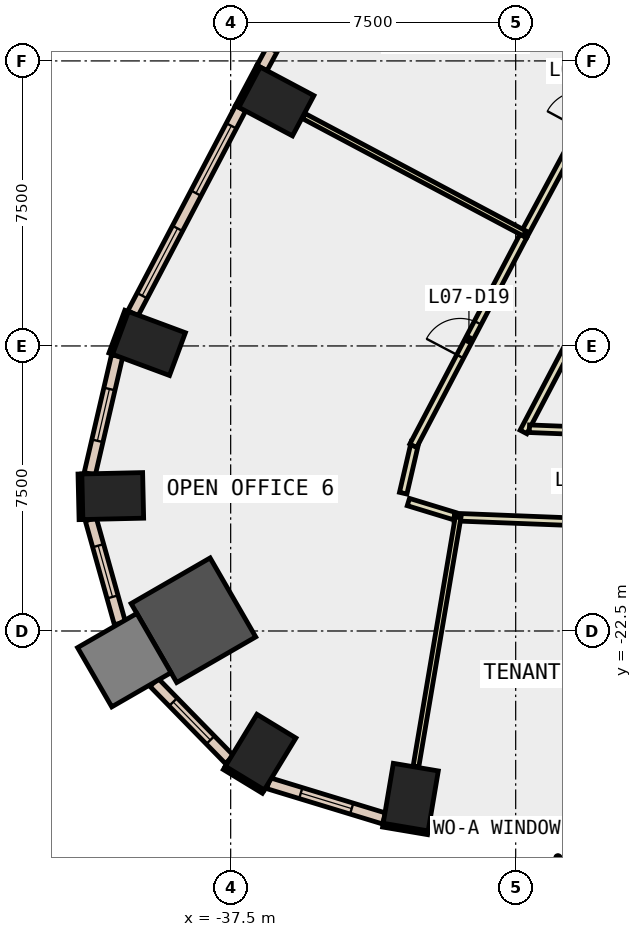
"""IFC4 building model, lengths in metres.
Left out: names, types, materials, properties, quantities, classifications, styles, units other than length and angle.
Written with IfcOpenShell. Run it as: python <this file> out.ifc"""

import sys

from ifc_helpers import new_model, si_unit, direction, frame, frame_2d, origin, origin_2d, place, context, subcontext, project, spatial, rectangle, extrude, element, fill, save


model = new_model("IFC4")
c1 = context("Model", 3, precision=1e-05, world=origin(), true_north=direction((0.0, 1.0)))
c2 = subcontext(c1, "Body", "Model", "MODEL_VIEW")
j1 = project(units=[si_unit("LENGTHUNIT", "METRE"), si_unit("PLANEANGLEUNIT", "RADIAN")], contexts=[c1])
p1 = place(None, origin())
s1 = spatial("IfcSite", under=j1, at=p1, CompositionType="ELEMENT")
p2 = place(p1, origin())
s2 = spatial("IfcBuilding", under=s1, at=p2, CompositionType="ELEMENT")
p3 = place(p2, frame((0.0, 0.0, 39.2)))
s3 = spatial("IfcBuildingStorey", under=s2, at=p3, CompositionType="ELEMENT", Elevation=39.2)
for number, where, z_axis, x_axis in (
    (1, (-32.761, -26.871, -0.4), (0.0, 0.0, 1.0), (-0.986, 0.167, 0.0)),
    (2, (-36.298, -8.567, -0.4), (0.0, 0.0, 1.0), (0.469, 0.883, 0.0)),
    (3, (-39.65, -14.936, -0.4), (0.0, 0.0, 1.0), (0.348, 0.937, 0.0)),
    (4, (-40.603, -18.95, -0.4), (0.0, 0.0, 1.0), (-0.023, 1.0, 0.0)),
):
    element("IfcColumn", number, at=place(p3, frame(where, z_axis=z_axis, x_axis=x_axis)), inside=s3, PredefinedType="COLUMN", context=c2, shape_type="SweptSolid", body=[
        extrude(rectangle(XDim=1.2, YDim=1.6, at=origin_2d()), origin(), (0.0, 0.0, 1.0), 4.2),
    ])
p4 = place(p3, frame((-38.48, -22.217, -0.4), z_axis=(0.0, 0.0, 1.0), x_axis=(0.866025403784, 0.5, 0.0)))
e5 = element("IfcColumn", 5, at=p4, inside=s3, PredefinedType="COLUMN", context=c2, shape_type="SweptSolid", body=[
    extrude(rectangle(XDim=2.4, YDim=2.4, at=origin_2d()), origin(), (0.0, 0.0, 1.0), 4.2),
])
p5 = place(p3, frame((-36.712, -25.688, -0.4), z_axis=(0.0, 0.0, 1.0), x_axis=(-0.854522294989, 0.519414716163, 0.0)))
e6 = element("IfcColumn", 6, at=p5, inside=s3, PredefinedType="COLUMN", context=c2, shape_type="SweptSolid", body=[
    extrude(rectangle(XDim=1.2, YDim=1.6, at=origin_2d()), origin(), (0.0, 0.0, 1.0), 4.2),
])
p6 = place(p3, frame((-40.299, -23.267, -0.4), z_axis=(0.0, 0.0, 1.0), x_axis=(0.866025403784, 0.5, 0.0)))
e7 = element("IfcColumn", 7, at=p6, inside=s3, PredefinedType="COLUMN", context=c2, shape_type="SweptSolid", body=[
    extrude(rectangle(XDim=1.8, YDim=1.8, at=origin_2d()), origin(), (0.0, 0.0, 1.0), 4.2),
])
p7 = place(p3, frame((-36.767, -7.639, 0.0), z_axis=(0.0, 0.0, 1.0), x_axis=(-0.469383408131, -0.882994459876, 0.0)))
e8 = element("IfcWall", 8, at=p7, inside=s3, PredefinedType="STANDARD", context=c2, shape_type="SweptSolid", body=[
    extrude(rectangle(XDim=1.199, YDim=0.1, at=frame_2d((0.6, 0.0))), origin(), (0.0, 0.0, 1.0), 3.8),
])
p8 = place(p3, frame((-40.238, -14.078, 0.0), z_axis=(0.0, 0.0, 1.0), x_axis=(-0.348268249601, -0.937394914814, 0.0)))
e9 = element("IfcWall", 9, at=p8, inside=s3, PredefinedType="STANDARD", context=c2, shape_type="SweptSolid", body=[
    extrude(rectangle(XDim=1.2, YDim=0.1, at=frame_2d((0.6, 0.0))), origin(), (0.0, 0.0, 1.0), 3.8),
])
p9 = place(p3, frame((-33.494, -27.609, 0.0), z_axis=(0.0, 0.0, 1.0), x_axis=(0.98597830993, -0.166873522011, 0.0)))
e10 = element("IfcWall", 10, at=p9, inside=s3, PredefinedType="STANDARD", context=c2, shape_type="SweptSolid", body=[
    extrude(rectangle(XDim=1.2, YDim=0.1, at=frame_2d((0.6, 0.0))), origin(), (0.0, 0.0, 1.0), 3.8),
])
for number, where, z_axis, x_axis in (
    (11, (-41.467, -18.369, 0.0), (0.0, 0.0, 1.0), (0.023, -1.0, 0.0)),
    (12, (-37.666, -26.103, 0.0), (0.0, 0.0, 1.0), (0.855, -0.519, 0.0)),
):
    element("IfcWall", number, at=place(p3, frame(where, z_axis=z_axis, x_axis=x_axis)), inside=s3, PredefinedType="STANDARD", context=c2, shape_type="SweptSolid", body=[
        extrude(rectangle(XDim=1.2, YDim=0.1, at=frame_2d((0.6, 0.0))), origin(), (0.0, 0.0, 1.0), 3.8),
    ])
p10 = place(p3, frame((-32.282, -27.633, 0.0), z_axis=(0.0, 0.0, 1.0), x_axis=(0.999228146648, -0.039282450878, 0.0)))
e13 = element("IfcWall", 13, at=p10, inside=s3, PredefinedType="STANDARD", context=c2, shape_type="SweptSolid", body=[
    extrude(rectangle(XDim=7.154, YDim=0.3, at=frame_2d((3.577, 0.0))), origin(), (0.0, 0.0, 1.0), 3.8),
])
p11 = place(p10, frame((0.588, 0.0, 0.9)))
e14 = element("IfcOpeningElement", 14, at=p11, cuts=e13, PredefinedType="OPENING", context=c2, shape_type="SweptSolid", body=[
    extrude(rectangle(XDim=2.4, YDim=2.6, at=frame_2d((1.2, 1.3))), frame((0.0, 0.16, 0.0), z_axis=(0.0, -1.0, 0.0), x_axis=(1.0, 0.0, 0.0)), (0.0, 0.0, 1.0), 0.32),
])
p12 = place(p10, frame((4.165, 0.0, 0.9)))
e15 = element("IfcOpeningElement", 15, at=p12, cuts=e13, PredefinedType="OPENING", context=c2, shape_type="SweptSolid", body=[
    extrude(rectangle(XDim=2.4, YDim=2.6, at=frame_2d((1.2, 1.3))), frame((0.0, 0.16, 0.0), z_axis=(0.0, -1.0, 0.0), x_axis=(1.0, 0.0, 0.0)), (0.0, 0.0, 1.0), 0.32),
])
p13 = place(p3, frame((-33.779, -2.301, 0.0), z_axis=(0.0, 0.0, 1.0), x_axis=(-0.47375467653, -0.880656860795, 0.0)))
e16 = element("IfcWall", 16, at=p13, inside=s3, PredefinedType="STANDARD", context=c2, shape_type="SweptSolid", body=[
    extrude(rectangle(XDim=6.117, YDim=0.3, at=frame_2d((3.059, 0.0))), origin(), (0.0, 0.0, 1.0), 3.8),
])
p14 = place(p13, frame((0.529, 0.0, 0.9)))
e17 = element("IfcOpeningElement", 17, at=p14, cuts=e16, PredefinedType="OPENING", context=c2, shape_type="SweptSolid", body=[
    extrude(rectangle(XDim=2.0, YDim=2.6, at=frame_2d((1.0, 1.3))), frame((0.0, 0.16, 0.0), z_axis=(0.0, -1.0, 0.0), x_axis=(1.0, 0.0, 0.0)), (0.0, 0.0, 1.0), 0.32),
])
p15 = place(p13, frame((3.588, 0.0, 0.9)))
e18 = element("IfcOpeningElement", 18, at=p15, cuts=e16, PredefinedType="OPENING", context=c2, shape_type="SweptSolid", body=[
    extrude(rectangle(XDim=2.0, YDim=2.6, at=frame_2d((1.0, 1.3))), frame((0.0, 0.16, 0.0), z_axis=(0.0, -1.0, 0.0), x_axis=(1.0, 0.0, 0.0)), (0.0, 0.0, 1.0), 0.32),
])
p16 = place(p3, frame((-37.239, -8.746, 0.0), z_axis=(0.0, 0.0, 1.0), x_axis=(-0.464913987781, -0.885355851602, 0.0)))
e19 = element("IfcWall", 19, at=p16, inside=s3, PredefinedType="STANDARD", context=c2, shape_type="SweptSolid", body=[
    extrude(rectangle(XDim=6.094, YDim=0.3, at=frame_2d((3.047, 0.0))), origin(), (0.0, 0.0, 1.0), 3.8),
])
p17 = place(p16, frame((0.523, 0.0, 0.9)))
e20 = element("IfcOpeningElement", 20, at=p17, cuts=e19, PredefinedType="OPENING", context=c2, shape_type="SweptSolid", body=[
    extrude(rectangle(XDim=2.0, YDim=2.6, at=frame_2d((1.0, 1.3))), frame((0.0, 0.16, 0.0), z_axis=(0.0, -1.0, 0.0), x_axis=(1.0, 0.0, 0.0)), (0.0, 0.0, 1.0), 0.32),
])
p18 = place(p16, frame((3.57, 0.0, 0.9)))
e21 = element("IfcOpeningElement", 21, at=p18, cuts=e19, PredefinedType="OPENING", context=c2, shape_type="SweptSolid", body=[
    extrude(rectangle(XDim=2.0, YDim=2.6, at=frame_2d((1.0, 1.3))), frame((0.0, 0.16, 0.0), z_axis=(0.0, -1.0, 0.0), x_axis=(1.0, 0.0, 0.0)), (0.0, 0.0, 1.0), 0.32),
])
p19 = place(p3, frame((-40.489, -15.264, 0.0), z_axis=(0.0, 0.0, 1.0), x_axis=(-0.225929520451, -0.974143650489, 0.0)))
e22 = element("IfcWall", 22, at=p19, inside=s3, PredefinedType="STANDARD", context=c2, shape_type="SweptSolid", body=[
    extrude(rectangle(XDim=3.182, YDim=0.3, at=frame_2d((1.591, 0.0))), origin(), (0.0, 0.0, 1.0), 3.8),
])
p20 = place(p19, frame((0.891, 0.0, 0.9)))
e23 = element("IfcOpeningElement", 23, at=p20, cuts=e22, PredefinedType="OPENING", context=c2, shape_type="SweptSolid", body=[
    extrude(rectangle(XDim=1.4, YDim=2.6, at=frame_2d((0.7, 1.3))), frame((0.0, 0.16, 0.0), z_axis=(0.0, -1.0, 0.0), x_axis=(1.0, 0.0, 0.0)), (0.0, 0.0, 1.0), 0.32),
])
p21 = place(p3, frame((-41.181, -19.562, 0.0), z_axis=(0.0, 0.0, 1.0), x_axis=(0.269754317033, -0.962929181426, 0.0)))
e24 = element("IfcWall", 24, at=p21, inside=s3, PredefinedType="STANDARD", context=c2, shape_type="SweptSolid", body=[
    extrude(rectangle(XDim=2.839, YDim=0.3, at=frame_2d((1.419, 0.0))), origin(), (0.0, 0.0, 1.0), 3.8),
])
p22 = place(p21, frame((0.72, 0.0, 0.9)))
e25 = element("IfcOpeningElement", 25, at=p22, cuts=e24, PredefinedType="OPENING", context=c2, shape_type="SweptSolid", body=[
    extrude(rectangle(XDim=1.4, YDim=2.6, at=frame_2d((0.7, 1.3))), frame((0.0, 0.16, 0.0), z_axis=(0.0, -1.0, 0.0), x_axis=(1.0, 0.0, 0.0)), (0.0, 0.0, 1.0), 0.32),
])
p23 = place(p3, frame((-39.516, -23.853, 0.0), z_axis=(0.0, 0.0, 1.0), x_axis=(0.699151821451, -0.714973237654, 0.0)))
e26 = element("IfcWall", 26, at=p23, inside=s3, PredefinedType="STANDARD", context=c2, shape_type="SweptSolid", body=[
    extrude(rectangle(XDim=2.839, YDim=0.3, at=frame_2d((1.42, 0.0))), origin(), (0.0, 0.0, 1.0), 3.8),
])
p24 = place(p23, frame((0.72, 0.0, 0.9)))
e27 = element("IfcOpeningElement", 27, at=p24, cuts=e26, PredefinedType="OPENING", context=c2, shape_type="SweptSolid", body=[
    extrude(rectangle(XDim=1.4, YDim=2.6, at=frame_2d((0.7, 1.3))), frame((0.0, 0.16, 0.0), z_axis=(0.0, -1.0, 0.0), x_axis=(1.0, 0.0, 0.0)), (0.0, 0.0, 1.0), 0.32),
])
p25 = place(p3, frame((-36.507, -26.505, 0.0), z_axis=(0.0, 0.0, 1.0), x_axis=(0.95648967224, -0.291766185322, 0.0)))
e28 = element("IfcWall", 28, at=p25, inside=s3, PredefinedType="STANDARD", context=c2, shape_type="SweptSolid", body=[
    extrude(rectangle(XDim=3.181, YDim=0.3, at=frame_2d((1.591, 0.0))), origin(), (0.0, 0.0, 1.0), 3.8),
])
p26 = place(p25, frame((0.891, 0.0, 0.9)))
e29 = element("IfcOpeningElement", 29, at=p26, cuts=e28, PredefinedType="OPENING", context=c2, shape_type="SweptSolid", body=[
    extrude(rectangle(XDim=1.4, YDim=2.6, at=frame_2d((0.7, 1.3))), frame((0.0, 0.16, 0.0), z_axis=(0.0, -1.0, 0.0), x_axis=(1.0, 0.0, 0.0)), (0.0, 0.0, 1.0), 0.32),
])
p27 = place(p3, frame((-27.644, -13.167, 0.0), z_axis=(0.0, 0.0, 1.0), x_axis=(-0.464919738277, -0.885352831904, 0.0)))
e30 = element("IfcWall", 30, at=p27, inside=s3, PredefinedType="PARTITIONING", context=c2, shape_type="SweptSolid", body=[
    extrude(rectangle(XDim=4.626, YDim=0.2, at=frame_2d((2.313, 0.0))), origin(), (0.0, 0.0, 1.0), 3.8),
])
p28 = place(p3, frame((-29.639, -17.178, 0.0), z_axis=(0.0, 0.0, 1.0), x_axis=(0.999228076722, -0.039284229546, 0.0)))
e31 = element("IfcWall", 31, at=p28, inside=s3, PredefinedType="PARTITIONING", context=c2, shape_type="SweptSolid", body=[
    extrude(rectangle(XDim=4.021, YDim=0.2, at=frame_2d((2.01, 0.0))), origin(), (0.0, 0.0, 1.0), 3.8),
])
p29 = place(p3, frame((-29.799, -12.106, 0.0), z_axis=(0.0, 0.0, 1.0), x_axis=(0.473681086062, 0.880696445268, 0.0)))
e32 = element("IfcWall", 32, at=p29, inside=s3, PredefinedType="PARTITIONING", context=c2, shape_type="SweptSolid", body=[
    extrude(rectangle(XDim=7.233, YDim=0.2, at=frame_2d((3.616, 0.0))), origin(), (0.0, 0.0, 1.0), 3.8),
])
p30 = place(p29, frame((3.191, 0.0, 0.0)))
e33 = element("IfcOpeningElement", 33, at=p30, cuts=e32, PredefinedType="OPENING", context=c2, shape_type="SweptSolid", body=[
    extrude(rectangle(XDim=1.0, YDim=2.1, at=frame_2d((0.5, 1.05))), frame((0.0, 0.11, 0.0), z_axis=(0.0, -1.0, 0.0), x_axis=(1.0, 0.0, 0.0)), (0.0, 0.0, 1.0), 0.22),
])
p31 = place(p3, frame((-31.611, -19.477, 0.0), z_axis=(0.0, 0.0, 1.0), x_axis=(-0.956459113118, 0.291866347723, 0.0)))
e34 = element("IfcWall", 34, at=p31, inside=s3, PredefinedType="PARTITIONING", context=c2, shape_type="SweptSolid", body=[
    extrude(rectangle(XDim=1.268, YDim=0.2, at=frame_2d((0.634, 0.0))), origin(), (0.0, 0.0, 1.0), 3.8),
])
p32 = place(p3, frame((-32.96, -18.874, 0.0), z_axis=(0.0, 0.0, 1.0), x_axis=(0.226081445763, 0.974108402531, 0.0)))
e35 = element("IfcWall", 35, at=p32, inside=s3, PredefinedType="PARTITIONING", context=c2, shape_type="SweptSolid", body=[
    extrude(rectangle(XDim=1.371, YDim=0.2, at=frame_2d((0.686, 0.0))), origin(), (0.0, 0.0, 1.0), 3.8),
])
p33 = place(p3, frame((-32.696, -17.626, 0.0), z_axis=(0.0, 0.0, 1.0), x_axis=(0.464767882002, 0.885432558617, 0.0)))
e36 = element("IfcWall", 36, at=p33, inside=s3, PredefinedType="PARTITIONING", context=c2, shape_type="SweptSolid", body=[
    extrude(rectangle(XDim=6.233, YDim=0.2, at=frame_2d((3.117, 0.0))), origin(), (0.0, 0.0, 1.0), 3.8),
])
p34 = place(p33, frame((2.654, 0.0, 0.0)))
e37 = element("IfcOpeningElement", 37, at=p34, cuts=e36, PredefinedType="OPENING", context=c2, shape_type="SweptSolid", body=[
    extrude(rectangle(XDim=1.0, YDim=2.1, at=frame_2d((0.5, 1.05))), frame((0.0, 0.11, 0.0), z_axis=(0.0, -1.0, 0.0), x_axis=(1.0, 0.0, 0.0)), (0.0, 0.0, 1.0), 0.22),
])
p35 = place(p3, frame((-24.186, -19.795, 0.0), z_axis=(0.0, 0.0, 1.0), x_axis=(-0.9992284676, 0.039274285953, 0.0)))
e38 = element("IfcWall", 38, at=p35, inside=s3, PredefinedType="PARTITIONING", context=c2, shape_type="SweptSolid", body=[
    extrude(rectangle(XDim=7.435, YDim=0.2, at=frame_2d((3.717, 0.0))), origin(), (0.0, 0.0, 1.0), 3.8),
])
p36 = place(p35, frame((3.217, 0.0, 0.0)))
e39 = element("IfcOpeningElement", 39, at=p36, cuts=e38, PredefinedType="OPENING", context=c2, shape_type="SweptSolid", body=[
    extrude(rectangle(XDim=1.0, YDim=2.1, at=frame_2d((0.5, 1.05))), frame((0.0, 0.11, 0.0), z_axis=(0.0, -1.0, 0.0), x_axis=(1.0, 0.0, 0.0)), (0.0, 0.0, 1.0), 0.22),
])
p37 = place(p3, frame((-29.764, -12.04, 0.0), z_axis=(0.0, 0.0, 1.0), x_axis=(-0.883018657393, 0.469337885426, 0.0)))
e40 = element("IfcWall", 40, at=p37, inside=s3, PredefinedType="PARTITIONING", context=c2, shape_type="SweptSolid", body=[
    extrude(rectangle(XDim=6.58, YDim=0.15, at=frame_2d((3.29, 0.0))), origin(), (0.0, 0.0, 1.0), 3.8),
])
p38 = place(p3, frame((-31.515, -19.506, 0.0), z_axis=(0.0, 0.0, 1.0), x_axis=(-0.166785823947, -0.985993148521, 0.0)))
e41 = element("IfcWall", 41, at=p38, inside=s3, PredefinedType="PARTITIONING", context=c2, shape_type="SweptSolid", body=[
    extrude(rectangle(XDim=6.65, YDim=0.15, at=frame_2d((3.325, 0.0))), origin(), (0.0, 0.0, 1.0), 3.8),
])
p39 = place(p11, origin())
e42 = element("IfcWindow", 42, at=p39, inside=s3, PartitioningType="SINGLE_PANEL", PredefinedType="WINDOW", context=c2, shape_type="SweptSolid", body=[
    extrude(rectangle(XDim=2.4, YDim=2.6, at=frame_2d((1.2, 1.3))), frame((0.0, 0.03, 0.0), z_axis=(0.0, -1.0, 0.0), x_axis=(1.0, 0.0, 0.0)), (0.0, 0.0, 1.0), 0.06),
])
fill(e14, e42)
p40 = place(p17, origin())
e43 = element("IfcWindow", 43, at=p40, inside=s3, PartitioningType="SINGLE_PANEL", PredefinedType="WINDOW", context=c2, shape_type="SweptSolid", body=[
    extrude(rectangle(XDim=2.0, YDim=2.6, at=frame_2d((1.0, 1.3))), frame((0.0, 0.03, 0.0), z_axis=(0.0, -1.0, 0.0), x_axis=(1.0, 0.0, 0.0)), (0.0, 0.0, 1.0), 0.06),
])
fill(e20, e43)
p41 = place(p18, origin())
e44 = element("IfcWindow", 44, at=p41, inside=s3, PartitioningType="SINGLE_PANEL", PredefinedType="WINDOW", context=c2, shape_type="SweptSolid", body=[
    extrude(rectangle(XDim=2.0, YDim=2.6, at=frame_2d((1.0, 1.3))), frame((0.0, 0.03, 0.0), z_axis=(0.0, -1.0, 0.0), x_axis=(1.0, 0.0, 0.0)), (0.0, 0.0, 1.0), 0.06),
])
fill(e21, e44)
p42 = place(p20, origin())
e45 = element("IfcWindow", 45, at=p42, inside=s3, PartitioningType="SINGLE_PANEL", PredefinedType="WINDOW", context=c2, shape_type="SweptSolid", body=[
    extrude(rectangle(XDim=1.4, YDim=2.6, at=frame_2d((0.7, 1.3))), frame((0.0, 0.03, 0.0), z_axis=(0.0, -1.0, 0.0), x_axis=(1.0, 0.0, 0.0)), (0.0, 0.0, 1.0), 0.06),
])
fill(e23, e45)
p43 = place(p22, origin())
e46 = element("IfcWindow", 46, at=p43, inside=s3, PartitioningType="SINGLE_PANEL", PredefinedType="WINDOW", context=c2, shape_type="SweptSolid", body=[
    extrude(rectangle(XDim=1.4, YDim=2.6, at=frame_2d((0.7, 1.3))), frame((0.0, 0.03, 0.0), z_axis=(0.0, -1.0, 0.0), x_axis=(1.0, 0.0, 0.0)), (0.0, 0.0, 1.0), 0.06),
])
fill(e25, e46)
p44 = place(p24, origin())
e47 = element("IfcWindow", 47, at=p44, inside=s3, PartitioningType="SINGLE_PANEL", PredefinedType="WINDOW", context=c2, shape_type="SweptSolid", body=[
    extrude(rectangle(XDim=1.4, YDim=2.6, at=frame_2d((0.7, 1.3))), frame((0.0, 0.03, 0.0), z_axis=(0.0, -1.0, 0.0), x_axis=(1.0, 0.0, 0.0)), (0.0, 0.0, 1.0), 0.06),
])
fill(e27, e47)
p45 = place(p26, origin())
e48 = element("IfcWindow", 48, at=p45, inside=s3, PartitioningType="SINGLE_PANEL", PredefinedType="WINDOW", context=c2, shape_type="SweptSolid", body=[
    extrude(rectangle(XDim=1.4, YDim=2.6, at=frame_2d((0.7, 1.3))), frame((0.0, 0.03, 0.0), z_axis=(0.0, -1.0, 0.0), x_axis=(1.0, 0.0, 0.0)), (0.0, 0.0, 1.0), 0.06),
])
fill(e29, e48)
p46 = place(p34, origin())
e49 = element("IfcDoor", 49, at=p46, inside=s3, OperationType="SINGLE_SWING_RIGHT", PredefinedType="DOOR", context=c2, shape_type="SweptSolid", body=[
    extrude(rectangle(XDim=1.0, YDim=2.1, at=frame_2d((0.5, 1.05))), frame((0.0, 0.025, 0.0), z_axis=(0.0, -1.0, 0.0), x_axis=(1.0, 0.0, 0.0)), (0.0, 0.0, 1.0), 0.05),
])
fill(e37, e49)
save(model, sys.argv[1])
